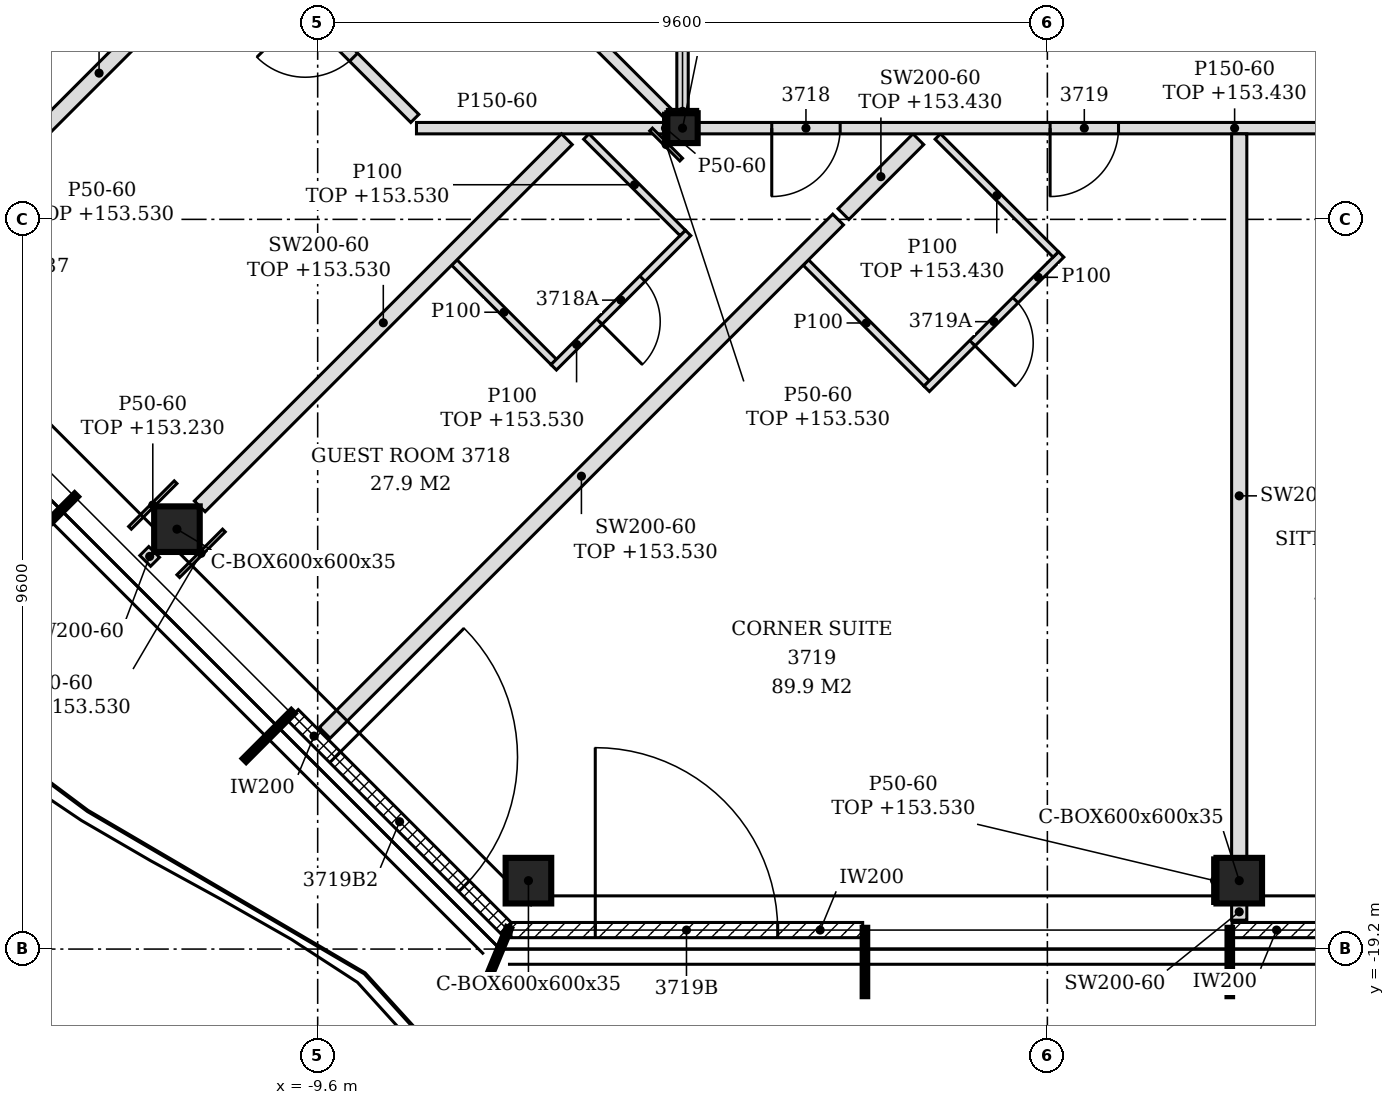
"""IFC4 building model, lengths in metres.
Left out: names, types, materials, properties, quantities, classifications, styles, units other than length and angle.
Written with IfcOpenShell. Run it as: python <this file> out.ifc"""

import sys

from ifc_helpers import new_model, si_unit, direction, frame, frame_2d, origin, origin_2d, place, context, subcontext, project, spatial, polyline, rectangle, hollow_rectangle, i_section, outline, extrude, element, fill, save


model = new_model("IFC4")
c1 = context("Model", 3, precision=1e-05, world=origin(), true_north=direction((0.0, 1.0)))
c2 = subcontext(c1, "Body", "Model", "MODEL_VIEW")
j1 = project(units=[si_unit("LENGTHUNIT", "METRE"), si_unit("PLANEANGLEUNIT", "RADIAN")], contexts=[c1])
p1 = place(None, origin())
s1 = spatial("IfcSite", under=j1, at=p1, CompositionType="ELEMENT")
p2 = place(p1, origin())
s2 = spatial("IfcBuilding", under=s1, at=p2, CompositionType="ELEMENT")
p3 = place(p2, frame((0.0, 0.0, 150.6)))
s3 = spatial("IfcBuildingStorey", under=s2, at=p3, CompositionType="ELEMENT", Elevation=150.6)
for number, where, z_axis, x_axis in (
    (1, (-6.827, -18.3, -0.15), (0.0, 0.0, 1.0), (1.0, 0.0, 0.0)),
    (2, (2.524, -18.3, -0.15), (0.0, 0.0, 1.0), (1.0, 0.0, 0.0)),
    (3, (-11.451, -13.676, -0.15), (0.0, 0.0, 1.0), (1.0, 0.0, 0.0)),
):
    element("IfcColumn", number, at=place(p3, frame(where, z_axis=z_axis, x_axis=x_axis)), inside=s3, PredefinedType="COLUMN", context=c2, shape_type="SweptSolid", body=[
        extrude(hollow_rectangle(XDim=0.6, YDim=0.6, WallThickness=0.035, at=origin_2d()), origin(), (0.0, 0.0, 1.0), 3.6),
    ])
p4 = place(p3, frame((-4.8, -8.4, -0.15), z_axis=(0.0, 0.0, 1.0), x_axis=(1.0, 0.0, 0.0)))
e4 = element("IfcColumn", 4, at=p4, inside=s3, PredefinedType="COLUMN", context=c2, shape_type="SweptSolid", body=[
    extrude(i_section(OverallWidth=0.399, OverallDepth=0.393, WebThickness=0.023, FlangeThickness=0.037, FilletRadius=0.015, at=origin_2d()), origin(), (0.0, 0.0, 1.0), 3.6),
])
p5 = place(p3, frame((-7.056, -18.95, 0.0), z_axis=(0.0, 0.0, 1.0), x_axis=(1.0, 0.0, 0.0)))
e5 = element("IfcWall", 5, at=p5, inside=s3, PredefinedType="NOTDEFINED", context=c2, shape_type="SweptSolid", body=[
    extrude(rectangle(XDim=4.626, YDim=0.2, at=frame_2d((2.313, 0.0))), origin(), (0.0, 0.0, 1.0), 3.45),
])
p6 = place(p5, frame((1.108, 0.0, 0.0)))
e6 = element("IfcOpeningElement", 6, at=p6, cuts=e5, PredefinedType="OPENING", context=c2, shape_type="SweptSolid", body=[
    extrude(rectangle(XDim=2.4, YDim=2.4, at=frame_2d((1.2, 1.2))), frame((0.0, 0.11, 0.0), z_axis=(0.0, -1.0, 0.0), x_axis=(1.0, 0.0, 0.0)), (0.0, 0.0, 1.0), 0.22),
])
p7 = place(p3, frame((2.43, -18.95, 0.0), z_axis=(0.0, 0.0, 1.0), x_axis=(1.0, 0.0, 0.0)))
e7 = element("IfcWall", 7, at=p7, inside=s3, PredefinedType="NOTDEFINED", context=c2, shape_type="SweptSolid", body=[
    extrude(rectangle(XDim=4.74, YDim=0.2, at=frame_2d((2.37, 0.0))), origin(), (0.0, 0.0, 1.0), 3.45),
])
p8 = place(p7, frame((1.17, 0.0, 0.0)))
e8 = element("IfcOpeningElement", 8, at=p8, cuts=e7, PredefinedType="OPENING", context=c2, shape_type="SweptSolid", body=[
    extrude(rectangle(XDim=2.4, YDim=2.4, at=frame_2d((1.2, 1.2))), frame((0.0, 0.11, 0.0), z_axis=(0.0, -1.0, 0.0), x_axis=(1.0, 0.0, 0.0)), (0.0, 0.0, 1.0), 0.22),
])
p9 = place(p3, frame((-9.926, -16.121, 0.0), z_axis=(0.0, 0.0, 1.0), x_axis=(0.707137595296, -0.707075965734, 0.0)))
e9 = element("IfcWall", 9, at=p9, inside=s3, PredefinedType="NOTDEFINED", context=c2, shape_type="SweptSolid", body=[
    extrude(rectangle(XDim=3.961, YDim=0.2, at=frame_2d((1.981, 0.0))), origin(), (0.0, 0.0, 1.0), 3.45),
])
p10 = place(p9, frame((0.785, 0.0, 0.0)))
e10 = element("IfcOpeningElement", 10, at=p10, cuts=e9, PredefinedType="OPENING", context=c2, shape_type="SweptSolid", body=[
    extrude(rectangle(XDim=2.4, YDim=2.4, at=frame_2d((1.2, 1.2))), frame((0.0, 0.11, 0.0), z_axis=(0.0, -1.0, 0.0), x_axis=(1.0, 0.0, 0.0)), (0.0, 0.0, 1.0), 0.22),
])
p11 = place(p3, frame((2.524, -18.82, 0.0), z_axis=(0.0, 0.0, 1.0), x_axis=(0.0, 1.0, 0.0)))
e11 = element("IfcWall", 11, at=p11, inside=s3, PredefinedType="PARTITIONING", context=c2, shape_type="SweptSolid", body=[
    extrude(rectangle(XDim=0.22, YDim=0.2, at=frame_2d((0.11, 0.0))), origin(), (0.0, 0.0, 1.0), 3.45),
])
p12 = place(p3, frame((2.524, -18.0, 0.0), z_axis=(0.0, 0.0, 1.0), x_axis=(0.0, 1.0, 0.0)))
e12 = element("IfcWall", 12, at=p12, inside=s3, PredefinedType="PARTITIONING", context=c2, shape_type="SweptSolid", body=[
    extrude(outline(polyline([(0.0, 0.0), (9.525, 0.0), (9.525, 2.83), (9.45, 2.83), (9.448, 3.45), (3.705, 3.45), (3.703, 2.88), (3.495, 2.88), (3.493, 3.45), (0.0, 3.45), (0.0, 0.0)])), frame((0.0, 0.1, 0.0), z_axis=(0.0, -1.0, 0.0), x_axis=(1.0, 0.0, 0.0)), (0.0, 0.0, 1.0), 0.2),
])
p13 = place(p3, frame((-9.507, -16.355, 0.0), z_axis=(0.0, 0.0, 1.0), x_axis=(0.707170680804, 0.707042875794, 0.0)))
e13 = element("IfcWall", 13, at=p13, inside=s3, PredefinedType="PARTITIONING", context=c2, shape_type="SweptSolid", body=[
    extrude(rectangle(XDim=9.551, YDim=0.2, at=frame_2d((4.776, 0.0))), origin(), (0.0, 0.0, 1.0), 2.93),
])
p14 = place(p3, frame((-11.869, -14.093, 0.0), z_axis=(0.0, 0.0, 1.0), x_axis=(0.707106781187, 0.707106781187, 0.0)))
e14 = element("IfcWall", 14, at=p14, inside=s3, PredefinedType="PARTITIONING", context=c2, shape_type="SweptSolid", body=[
    extrude(rectangle(XDim=0.166, YDim=0.2, at=frame_2d((0.083, 0.0))), origin(), (0.0, 0.0, 1.0), 3.45),
])
p15 = place(p3, frame((-11.152, -13.375, 0.0), z_axis=(0.0, 0.0, 1.0), x_axis=(0.707106781187, 0.707106781187, 0.0)))
e15 = element("IfcWall", 15, at=p15, inside=s3, PredefinedType="PARTITIONING", context=c2, shape_type="SweptSolid", body=[
    extrude(rectangle(XDim=6.83, YDim=0.2, at=frame_2d((3.415, 0.0))), origin(), (0.0, 0.0, 1.0), 2.93),
])
p16 = place(p3, frame((-1.587, -11.759, 0.0), z_axis=(0.0, 0.0, 1.0), x_axis=(-0.706889644159, 0.707323851557, 0.0)))
e16 = element("IfcWall", 16, at=p16, inside=s3, PredefinedType="PARTITIONING", context=c2, shape_type="SweptSolid", body=[
    extrude(rectangle(XDim=2.249, YDim=0.1, at=frame_2d((1.125, 0.0))), origin(), (0.0, 0.0, 1.0), 3.45),
])
p17 = place(p3, frame((-1.587, -11.829, 0.0), z_axis=(0.0, 0.0, 1.0), x_axis=(0.707350821469, 0.706862656651, 0.0)))
e17 = element("IfcWall", 17, at=p17, inside=s3, PredefinedType="PARTITIONING", context=c2, shape_type="SweptSolid", body=[
    extrude(rectangle(XDim=2.5, YDim=0.1, at=frame_2d((1.25, 0.0))), origin(), (0.0, 0.0, 1.0), 3.45),
])
p18 = place(p17, frame((0.85, 0.0, 0.0)))
e18 = element("IfcOpeningElement", 18, at=p18, cuts=e17, PredefinedType="OPENING", context=c2, shape_type="SweptSolid", body=[
    extrude(rectangle(XDim=0.8, YDim=2.1, at=frame_2d((0.4, 1.05))), frame((0.0, 0.06, 0.0), z_axis=(0.0, -1.0, 0.0), x_axis=(1.0, 0.0, 0.0)), (0.0, 0.0, 1.0), 0.12),
])
p19 = place(p3, frame((-6.494, -11.476, 0.0), z_axis=(0.0, 0.0, 1.0), x_axis=(-0.707106781187, 0.707106781187, 0.0)))
e19 = element("IfcWall", 19, at=p19, inside=s3, PredefinedType="PARTITIONING", context=c2, shape_type="SweptSolid", body=[
    extrude(rectangle(XDim=1.85, YDim=0.1, at=frame_2d((0.925, 0.0))), origin(), (0.0, 0.0, 1.0), 3.45),
])
p20 = place(p3, frame((-6.494, -11.546, 0.0), z_axis=(0.0, 0.0, 1.0), x_axis=(0.707106781187, 0.707106781187, 0.0)))
e20 = element("IfcWall", 20, at=p20, inside=s3, PredefinedType="PARTITIONING", context=c2, shape_type="SweptSolid", body=[
    extrude(rectangle(XDim=2.5, YDim=0.1, at=frame_2d((1.25, 0.0))), origin(), (0.0, 0.0, 1.0), 2.93),
])
p21 = place(p20, frame((0.85, 0.0, 0.0)))
e21 = element("IfcOpeningElement", 21, at=p21, cuts=e20, PredefinedType="OPENING", context=c2, shape_type="SweptSolid", body=[
    extrude(rectangle(XDim=0.8, YDim=2.1, at=frame_2d((0.4, 1.05))), frame((0.0, 0.06, 0.0), z_axis=(0.0, -1.0, 0.0), x_axis=(1.0, 0.0, 0.0)), (0.0, 0.0, 1.0), 0.12),
])
p22 = place(p3, frame((0.111, -10.062, 0.0), z_axis=(0.0, 0.0, 1.0), x_axis=(-0.70732924673, 0.706884245631, 0.0)))
e22 = element("IfcWall", 22, at=p22, inside=s3, PredefinedType="PARTITIONING", context=c2, shape_type="SweptSolid", body=[
    extrude(rectangle(XDim=2.195, YDim=0.1, at=frame_2d((1.097, 0.0))), origin(), (0.0, 0.0, 1.0), 2.83),
])
p23 = place(p3, frame((-4.797, -9.779, 0.0), z_axis=(0.0, 0.0, 1.0), x_axis=(-0.707174840937, 0.707038714885, 0.0)))
e23 = element("IfcWall", 23, at=p23, inside=s3, PredefinedType="PARTITIONING", context=c2, shape_type="SweptSolid", body=[
    extrude(rectangle(XDim=1.793, YDim=0.1, at=frame_2d((0.897, 0.0))), origin(), (0.0, 0.0, 1.0), 2.93),
])
p24 = place(p3, frame((-2.683, -9.531, 0.0), z_axis=(0.0, 0.0, 1.0), x_axis=(0.707019164958, 0.70719438656, 0.0)))
e24 = element("IfcWall", 24, at=p24, inside=s3, PredefinedType="PARTITIONING", context=c2, shape_type="SweptSolid", body=[
    extrude(rectangle(XDim=1.393, YDim=0.2, at=frame_2d((0.697, 0.0))), origin(), (0.0, 0.0, 1.0), 2.83),
])
p25 = place(p3, frame((-14.202, -9.402, 0.0), z_axis=(0.0, 0.0, 1.0), x_axis=(0.707081776084, 0.707131785404, 0.0)))
e25 = element("IfcWall", 25, at=p25, inside=s3, PredefinedType="PARTITIONING", context=c2, shape_type="SweptSolid", body=[
    extrude(rectangle(XDim=4.882, YDim=0.2, at=frame_2d((2.441, 0.0))), origin(), (0.0, 0.0, 1.0), 2.93),
])
p26 = place(p3, frame((-8.3, -8.4, 0.0), z_axis=(0.0, 0.0, 1.0), x_axis=(1.0, 0.0, 0.0)))
e26 = element("IfcWall", 26, at=p26, inside=s3, PredefinedType="PARTITIONING", context=c2, shape_type="SweptSolid", body=[
    extrude(rectangle(XDim=3.301, YDim=0.15, at=frame_2d((1.65, 0.0))), origin(), (0.0, 0.0, 1.0), 3.45),
])
p27 = place(p3, frame((-4.601, -8.4, 0.0), z_axis=(0.0, 0.0, 1.0), x_axis=(1.0, 0.0, 0.0)))
e27 = element("IfcWall", 27, at=p27, inside=s3, PredefinedType="PARTITIONING", context=c2, shape_type="SweptSolid", body=[
    extrude(rectangle(XDim=11.601, YDim=0.15, at=frame_2d((5.801, 0.0))), origin(), (0.0, 0.0, 1.0), 2.83),
])
p28 = place(p27, frame((0.974, 0.0, 0.0)))
e28 = element("IfcOpeningElement", 28, at=p28, cuts=e27, PredefinedType="OPENING", context=c2, shape_type="SweptSolid", body=[
    extrude(rectangle(XDim=0.9, YDim=2.1, at=frame_2d((0.45, 1.05))), frame((0.0, 0.085, 0.0), z_axis=(0.0, -1.0, 0.0), x_axis=(1.0, 0.0, 0.0)), (0.0, 0.0, 1.0), 0.17),
])
p29 = place(p27, frame((4.636, 0.0, 0.0)))
e29 = element("IfcOpeningElement", 29, at=p29, cuts=e27, PredefinedType="OPENING", context=c2, shape_type="SweptSolid", body=[
    extrude(rectangle(XDim=0.9, YDim=2.1, at=frame_2d((0.45, 1.05))), frame((0.0, 0.085, 0.0), z_axis=(0.0, -1.0, 0.0), x_axis=(1.0, 0.0, 0.0)), (0.0, 0.0, 1.0), 0.17),
])
p30 = place(p27, frame((8.592, 0.0, 0.0)))
e30 = element("IfcOpeningElement", 30, at=p30, cuts=e27, PredefinedType="OPENING", context=c2, shape_type="SweptSolid", body=[
    extrude(rectangle(XDim=0.9, YDim=2.1, at=frame_2d((0.45, 1.05))), frame((0.0, 0.085, 0.0), z_axis=(0.0, -1.0, 0.0), x_axis=(1.0, 0.0, 0.0)), (0.0, 0.0, 1.0), 0.17),
])
p31 = place(p3, frame((-8.322, -8.272, 0.0), z_axis=(0.0, 0.0, 1.0), x_axis=(-0.707106781187, 0.707106781187, 0.0)))
e31 = element("IfcWall", 31, at=p31, inside=s3, PredefinedType="PARTITIONING", context=c2, shape_type="SweptSolid", body=[
    extrude(rectangle(XDim=5.021, YDim=0.15, at=frame_2d((2.51, 0.0))), origin(), (0.0, 0.0, 1.0), 2.93),
])
p32 = place(p31, frame((1.139, 0.0, 0.0)))
e32 = element("IfcOpeningElement", 32, at=p32, cuts=e31, PredefinedType="OPENING", context=c2, shape_type="SweptSolid", body=[
    extrude(rectangle(XDim=0.9, YDim=2.1, at=frame_2d((0.45, 1.05))), frame((0.0, 0.085, 0.0), z_axis=(0.0, -1.0, 0.0), x_axis=(1.0, 0.0, 0.0)), (0.0, 0.0, 1.0), 0.17),
])
p33 = place(p3, frame((-4.998, -8.202, 0.0), z_axis=(0.0, 0.0, 1.0), x_axis=(-0.707106781187, 0.707106781187, 0.0)))
e33 = element("IfcWall", 33, at=p33, inside=s3, PredefinedType="PARTITIONING", context=c2, shape_type="SweptSolid", body=[
    extrude(rectangle(XDim=6.327, YDim=0.15, at=frame_2d((3.164, 0.0))), origin(), (0.0, 0.0, 1.0), 2.93),
])
p34 = place(p33, frame((2.664, 0.0, 0.0)))
e34 = element("IfcOpeningElement", 34, at=p34, cuts=e33, PredefinedType="OPENING", context=c2, shape_type="SweptSolid", body=[
    extrude(rectangle(XDim=0.9, YDim=2.1, at=frame_2d((0.45, 1.05))), frame((0.0, 0.085, 0.0), z_axis=(0.0, -1.0, 0.0), x_axis=(1.0, 0.0, 0.0)), (0.0, 0.0, 1.0), 0.17),
])
p35 = place(p3, frame((-4.8, -8.204, 0.0), z_axis=(0.0, 0.0, 1.0), x_axis=(0.0, 1.0, 0.0)))
e35 = element("IfcWall", 35, at=p35, inside=s3, PredefinedType="PARTITIONING", context=c2, shape_type="SweptSolid", body=[
    extrude(rectangle(XDim=4.529, YDim=0.15, at=frame_2d((2.264, 0.0))), origin(), (0.0, 0.0, 1.0), 2.83),
])
p36 = place(p3, frame((2.199, -18.6, 0.0), z_axis=(0.0, 0.0, 1.0), x_axis=(0.0, 1.0, 0.0)))
e36 = element("IfcWall", 36, at=p36, inside=s3, PredefinedType="PARTITIONING", context=c2, shape_type="SweptSolid", body=[
    extrude(rectangle(XDim=0.6, YDim=0.05, at=frame_2d((0.3, 0.0))), origin(), (0.0, 0.0, 1.0), 2.93),
])
p37 = place(p3, frame((-12.069, -13.658, 0.0), z_axis=(0.0, 0.0, 1.0), x_axis=(0.707106781187, 0.707106781187, 0.0)))
e37 = element("IfcWall", 37, at=p37, inside=s3, PredefinedType="PARTITIONING", context=c2, shape_type="SweptSolid", body=[
    extrude(rectangle(XDim=0.848, YDim=0.05, at=frame_2d((0.424, 0.0))), origin(), (0.0, 0.0, 1.0), 2.63),
])
p38 = place(p3, frame((-11.434, -14.293, 0.0), z_axis=(0.0, 0.0, 1.0), x_axis=(0.707106781187, 0.707106781187, 0.0)))
e38 = element("IfcWall", 38, at=p38, inside=s3, PredefinedType="PARTITIONING", context=c2, shape_type="SweptSolid", body=[
    extrude(rectangle(XDim=0.849, YDim=0.05, at=frame_2d((0.424, 0.0))), origin(), (0.0, 0.0, 1.0), 2.93),
])
p39 = place(p3, frame((-5.0, -8.178, 0.0), z_axis=(0.0, 0.0, 1.0), x_axis=(1.0, 0.0, 0.0)))
e39 = element("IfcWall", 39, at=p39, inside=s3, PredefinedType="PARTITIONING", context=c2, shape_type="SweptSolid", body=[
    extrude(rectangle(XDim=0.399, YDim=0.05, at=frame_2d((0.199, 0.0))), origin(), (0.0, 0.0, 1.0), 2.83),
])
p40 = place(p3, frame((-4.818, -8.814, 0.0), z_axis=(0.0, 0.0, 1.0), x_axis=(-0.707106781187, 0.707106781187, 0.0)))
e40 = element("IfcWall", 40, at=p40, inside=s3, PredefinedType="PARTITIONING", context=c2, shape_type="SweptSolid", body=[
    extrude(rectangle(XDim=0.56, YDim=0.05, at=frame_2d((0.28, 0.0))), origin(), (0.0, 0.0, 1.0), 2.93),
])
p41 = place(p3, frame((-5.024, -8.596, 0.0), z_axis=(0.0, 0.0, 1.0), x_axis=(0.0, 1.0, 0.0)))
e41 = element("IfcWall", 41, at=p41, inside=s3, PredefinedType="PARTITIONING", context=c2, shape_type="SweptSolid", body=[
    extrude(rectangle(XDim=0.393, YDim=0.05, at=frame_2d((0.196, 0.0))), origin(), (0.0, 0.0, 1.0), 3.45),
])
p42 = place(p6, origin())
e42 = element("IfcDoor", 42, at=p42, inside=s3, OperationType="SINGLE_SWING_LEFT", PredefinedType="DOOR", context=c2, shape_type="SweptSolid", body=[
    extrude(rectangle(XDim=2.4, YDim=2.4, at=frame_2d((1.2, 1.2))), frame((0.0, 0.025, 0.0), z_axis=(0.0, -1.0, 0.0), x_axis=(1.0, 0.0, 0.0)), (0.0, 0.0, 1.0), 0.05),
])
fill(e6, e42)
p43 = place(p10, origin())
e43 = element("IfcDoor", 43, at=p43, inside=s3, OperationType="SINGLE_SWING_LEFT", PredefinedType="DOOR", context=c2, shape_type="SweptSolid", body=[
    extrude(rectangle(XDim=2.4, YDim=2.4, at=frame_2d((1.2, 1.2))), frame((0.0, 0.025, 0.0), z_axis=(0.0, -1.0, 0.0), x_axis=(1.0, 0.0, 0.0)), (0.0, 0.0, 1.0), 0.05),
])
fill(e10, e43)
p44 = place(p32, origin())
e44 = element("IfcDoor", 44, at=p44, inside=s3, OperationType="SINGLE_SWING_RIGHT", PredefinedType="DOOR", context=c2, shape_type="SweptSolid", body=[
    extrude(rectangle(XDim=0.9, YDim=2.1, at=frame_2d((0.45, 1.05))), frame((0.0, 0.025, 0.0), z_axis=(0.0, -1.0, 0.0), x_axis=(1.0, 0.0, 0.0)), (0.0, 0.0, 1.0), 0.05),
])
fill(e32, e44)
p45 = place(p28, frame((0.9, 0.0, 0.0), z_axis=(0.0, 0.0, 1.0), x_axis=(-1.0, 0.0, 0.0)))
e45 = element("IfcDoor", 45, at=p45, inside=s3, OperationType="SINGLE_SWING_RIGHT", PredefinedType="DOOR", context=c2, shape_type="SweptSolid", body=[
    extrude(rectangle(XDim=0.9, YDim=2.1, at=frame_2d((0.45, 1.05))), frame((0.0, 0.025, 0.0), z_axis=(0.0, -1.0, 0.0), x_axis=(1.0, 0.0, 0.0)), (0.0, 0.0, 1.0), 0.05),
])
fill(e28, e45)
p46 = place(p21, frame((0.8, 0.0, 0.0), z_axis=(0.0, 0.0, 1.0), x_axis=(-1.0, 0.0, 0.0)))
e46 = element("IfcDoor", 46, at=p46, inside=s3, OperationType="SINGLE_SWING_RIGHT", PredefinedType="DOOR", context=c2, shape_type="SweptSolid", body=[
    extrude(rectangle(XDim=0.8, YDim=2.1, at=frame_2d((0.4, 1.05))), frame((0.0, 0.025, 0.0), z_axis=(0.0, -1.0, 0.0), x_axis=(1.0, 0.0, 0.0)), (0.0, 0.0, 1.0), 0.05),
])
fill(e21, e46)
p47 = place(p29, frame((0.9, 0.0, 0.0), z_axis=(0.0, 0.0, 1.0), x_axis=(-1.0, 0.0, 0.0)))
e47 = element("IfcDoor", 47, at=p47, inside=s3, OperationType="SINGLE_SWING_RIGHT", PredefinedType="DOOR", context=c2, shape_type="SweptSolid", body=[
    extrude(rectangle(XDim=0.9, YDim=2.1, at=frame_2d((0.45, 1.05))), frame((0.0, 0.025, 0.0), z_axis=(0.0, -1.0, 0.0), x_axis=(1.0, 0.0, 0.0)), (0.0, 0.0, 1.0), 0.05),
])
fill(e29, e47)
p48 = place(p18, frame((0.8, 0.0, 0.0), z_axis=(0.0, 0.0, 1.0), x_axis=(-1.0, 0.0, 0.0)))
e48 = element("IfcDoor", 48, at=p48, inside=s3, OperationType="SINGLE_SWING_RIGHT", PredefinedType="DOOR", context=c2, shape_type="SweptSolid", body=[
    extrude(rectangle(XDim=0.8, YDim=2.1, at=frame_2d((0.4, 1.05))), frame((0.0, 0.025, 0.0), z_axis=(0.0, -1.0, 0.0), x_axis=(1.0, 0.0, 0.0)), (0.0, 0.0, 1.0), 0.05),
])
fill(e18, e48)
save(model, sys.argv[1])
